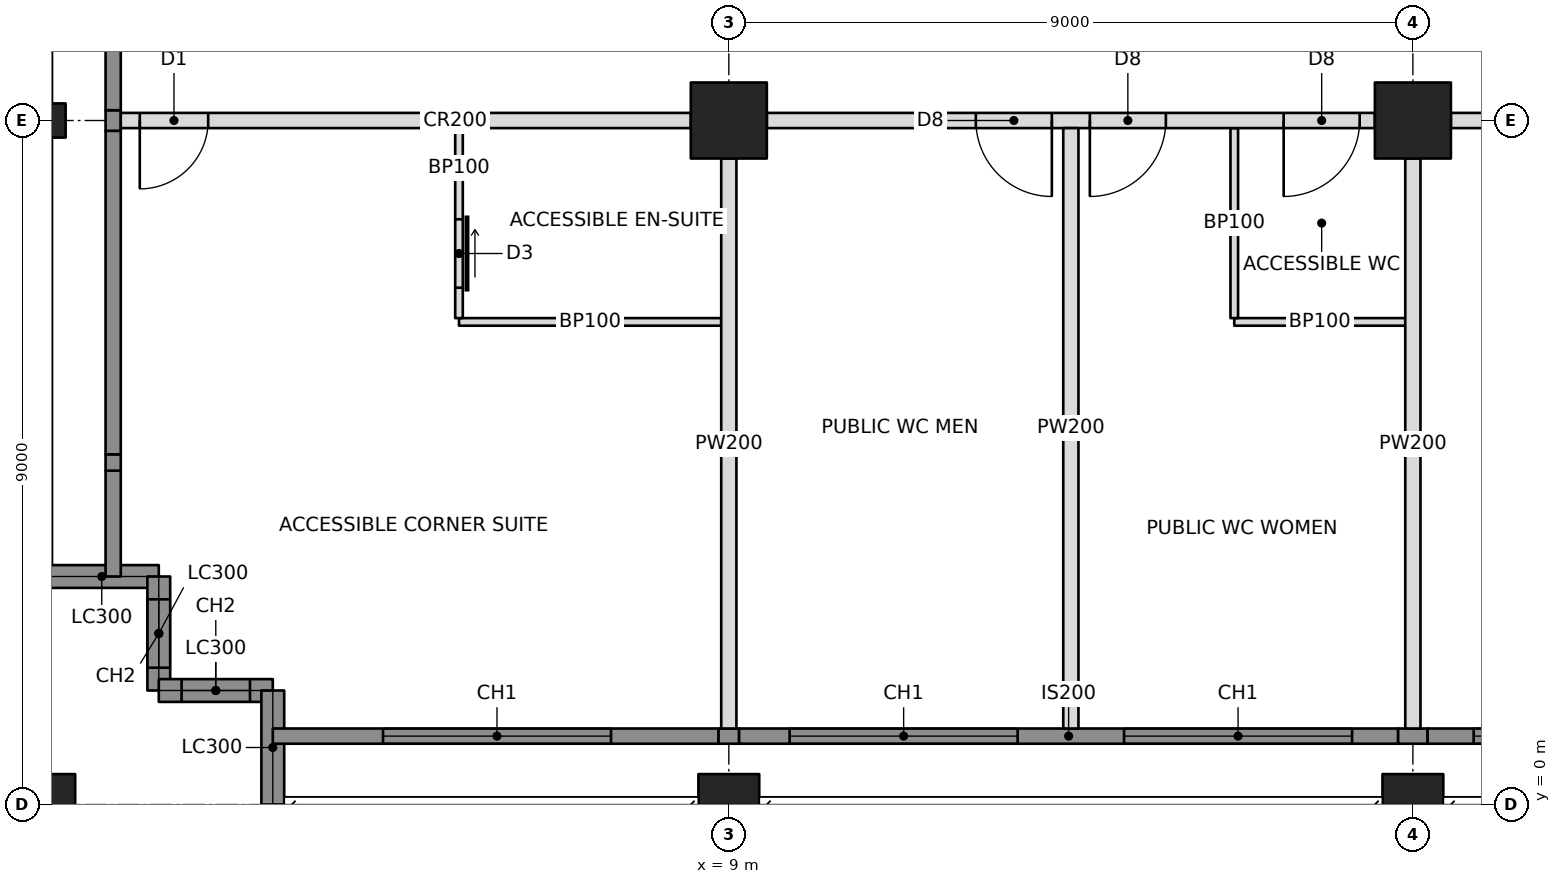
"""IFC4 building model, lengths in metres.
Left out: names, types, materials, properties, quantities, classifications, styles, units other than length and angle.
Written with IfcOpenShell. Run it as: python <this file> out.ifc"""

import sys

from ifc_helpers import new_model, si_unit, direction, frame, frame_2d, origin, origin_with_axes, origin_2d, place, context, subcontext, project, spatial, rectangle, hollow_rectangle, i_section, extrude, element, fill, save


model = new_model("IFC4")
c1 = context("Model", 3, precision=1e-05, world=origin(), true_north=direction((0.0, 1.0)))
c2 = subcontext(c1, "Body", "Model", "MODEL_VIEW")
j1 = project(units=[si_unit("LENGTHUNIT", "METRE"), si_unit("PLANEANGLEUNIT", "RADIAN")], contexts=[c1])
p1 = place(None, origin())
s1 = spatial("IfcSite", under=j1, at=p1, CompositionType="ELEMENT")
p2 = place(p1, origin())
s2 = spatial("IfcBuilding", under=s1, at=p2, CompositionType="ELEMENT")
p3 = place(p2, frame((0.0, 0.0, 94.2)))
s3 = spatial("IfcBuildingStorey", under=s2, at=p3, CompositionType="ELEMENT", Elevation=94.2)
p4 = place(p3, origin_with_axes())
e1 = element("IfcColumn", 1, at=p4, inside=s3, PredefinedType="COLUMN", context=c2, shape_type="SweptSolid", body=[
    extrude(hollow_rectangle(XDim=0.8, YDim=0.8, WallThickness=0.07, at=origin_2d()), origin(), (0.0, 0.0, 1.0), 3.4),
])
p5 = place(p3, frame((0.0, 9.0, 0.0), z_axis=(0.0, 0.0, 1.0), x_axis=(0.0, 1.0, 0.0)))
e2 = element("IfcColumn", 2, at=p5, inside=s3, PredefinedType="COLUMN", context=c2, shape_type="SweptSolid", body=[
    extrude(i_section(OverallWidth=0.449, OverallDepth=0.549, WebThickness=0.072, FlangeThickness=0.115, at=origin_2d()), origin(), (0.0, 0.0, 1.0), 3.4),
])
p6 = place(p3, frame((9.0, 0.0, 0.0), z_axis=(0.0, 0.0, 1.0), x_axis=(1.0, 0.0, 0.0)))
e3 = element("IfcColumn", 3, at=p6, inside=s3, PredefinedType="COLUMN", context=c2, shape_type="SweptSolid", body=[
    extrude(hollow_rectangle(XDim=0.8, YDim=0.8, WallThickness=0.07, at=origin_2d()), origin(), (0.0, 0.0, 1.0), 3.4),
])
p7 = place(p3, frame((9.0, 9.0, 0.0), z_axis=(0.0, 0.0, 1.0), x_axis=(1.0, 0.0, 0.0)))
e4 = element("IfcColumn", 4, at=p7, inside=s3, PredefinedType="COLUMN", context=c2, shape_type="SweptSolid", body=[
    extrude(hollow_rectangle(XDim=1.0, YDim=1.0, WallThickness=0.1, at=origin_2d()), origin(), (0.0, 0.0, 1.0), 3.4),
])
p8 = place(p3, frame((18.0, 0.0, 0.0), z_axis=(0.0, 0.0, 1.0), x_axis=(1.0, 0.0, 0.0)))
e5 = element("IfcColumn", 5, at=p8, inside=s3, PredefinedType="COLUMN", context=c2, shape_type="SweptSolid", body=[
    extrude(hollow_rectangle(XDim=0.8, YDim=0.8, WallThickness=0.07, at=origin_2d()), origin(), (0.0, 0.0, 1.0), 3.4),
])
p9 = place(p3, frame((18.0, 9.0, 0.0), z_axis=(0.0, 0.0, 1.0), x_axis=(1.0, 0.0, 0.0)))
e6 = element("IfcColumn", 6, at=p9, inside=s3, PredefinedType="COLUMN", context=c2, shape_type="SweptSolid", body=[
    extrude(hollow_rectangle(XDim=1.0, YDim=1.0, WallThickness=0.1, at=origin_2d()), origin(), (0.0, 0.0, 1.0), 3.4),
])
p10 = place(p3, frame((0.0, 3.0, 0.0), z_axis=(0.0, 0.0, 1.0), x_axis=(1.0, 0.0, 0.0)))
e7 = element("IfcWall", 7, at=p10, inside=s3, PredefinedType="SOLIDWALL", context=c2, shape_type="SweptSolid", body=[
    extrude(rectangle(XDim=1.5, YDim=0.3, at=frame_2d((0.75, 0.0))), origin(), (0.0, 0.0, 1.0), 2.42),
])
p11 = place(p3, frame((1.5, 3.0, 0.0), z_axis=(0.0, 0.0, 1.0), x_axis=(0.0, -1.0, 0.0)))
e8 = element("IfcWall", 8, at=p11, inside=s3, PredefinedType="SOLIDWALL", context=c2, shape_type="SweptSolid", body=[
    extrude(rectangle(XDim=1.5, YDim=0.3, at=frame_2d((0.75, 0.0))), origin(), (0.0, 0.0, 1.0), 3.2),
])
p12 = place(p11, frame((0.3, 0.0, 0.6)))
e9 = element("IfcOpeningElement", 9, at=p12, cuts=e8, PredefinedType="OPENING", context=c2, shape_type="SweptSolid", body=[
    extrude(rectangle(XDim=0.9, YDim=2.2, at=frame_2d((0.45, 1.1))), frame((0.0, 0.16, 0.0), z_axis=(0.0, -1.0, 0.0), x_axis=(1.0, 0.0, 0.0)), (0.0, 0.0, 1.0), 0.32),
])
p13 = place(p3, frame((1.5, 1.5, 0.0), z_axis=(0.0, 0.0, 1.0), x_axis=(1.0, 0.0, 0.0)))
e10 = element("IfcWall", 10, at=p13, inside=s3, PredefinedType="SOLIDWALL", context=c2, shape_type="SweptSolid", body=[
    extrude(rectangle(XDim=1.5, YDim=0.3, at=frame_2d((0.75, 0.0))), origin(), (0.0, 0.0, 1.0), 3.2),
])
p14 = place(p13, frame((0.3, 0.0, 0.6)))
e11 = element("IfcOpeningElement", 11, at=p14, cuts=e10, PredefinedType="OPENING", context=c2, shape_type="SweptSolid", body=[
    extrude(rectangle(XDim=0.9, YDim=2.2, at=frame_2d((0.45, 1.1))), frame((0.0, 0.16, 0.0), z_axis=(0.0, -1.0, 0.0), x_axis=(1.0, 0.0, 0.0)), (0.0, 0.0, 1.0), 0.32),
])
p15 = place(p3, frame((3.0, 1.5, 0.0), z_axis=(0.0, 0.0, 1.0), x_axis=(0.0, -1.0, 0.0)))
e12 = element("IfcWall", 12, at=p15, inside=s3, PredefinedType="SOLIDWALL", context=c2, shape_type="SweptSolid", body=[
    extrude(rectangle(XDim=1.5, YDim=0.3, at=frame_2d((0.75, 0.0))), origin(), (0.0, 0.0, 1.0), 2.42),
])
p16 = place(p3, frame((3.0, 0.9, 0.0), z_axis=(0.0, 0.0, 1.0), x_axis=(1.0, 0.0, 0.0)))
e13 = element("IfcWall", 13, at=p16, inside=s3, PredefinedType="SOLIDWALL", context=c2, shape_type="SweptSolid", body=[
    extrude(rectangle(XDim=5.865, YDim=0.2, at=frame_2d((2.932, 0.0))), origin(), (0.0, 0.0, 1.0), 3.2),
])
p17 = place(p16, frame((1.45, 0.0, 0.6)))
e14 = element("IfcOpeningElement", 14, at=p17, cuts=e13, PredefinedType="OPENING", context=c2, shape_type="SweptSolid", body=[
    extrude(rectangle(XDim=3.0, YDim=2.2, at=frame_2d((1.5, 1.1))), frame((0.0, 0.11, 0.0), z_axis=(0.0, -1.0, 0.0), x_axis=(1.0, 0.0, 0.0)), (0.0, 0.0, 1.0), 0.22),
])
p18 = place(p3, frame((0.9, 3.0, 0.0), z_axis=(0.0, 0.0, 1.0), x_axis=(0.0, 1.0, 0.0)))
e15 = element("IfcWall", 15, at=p18, inside=s3, PredefinedType="SOLIDWALL", context=c2, shape_type="SweptSolid", body=[
    extrude(rectangle(XDim=1.393, YDim=0.2, at=frame_2d((0.696, 0.0))), origin(), (0.0, 0.0, 1.0), 3.2),
])
p19 = place(p3, frame((1.0, 9.0, 0.0), z_axis=(0.0, 0.0, 1.0), x_axis=(1.0, 0.0, 0.0)))
e16 = element("IfcWall", 16, at=p19, inside=s3, PredefinedType="PARTITIONING", context=c2, shape_type="SweptSolid", body=[
    extrude(rectangle(XDim=7.5, YDim=0.2, at=frame_2d((3.75, 0.0))), origin(), (0.0, 0.0, 1.0), 2.438),
])
p20 = place(p19, frame((0.25, 0.0, 0.0)))
e17 = element("IfcOpeningElement", 17, at=p20, cuts=e16, PredefinedType="OPENING", context=c2, shape_type="SweptSolid", body=[
    extrude(rectangle(XDim=0.9, YDim=2.1, at=frame_2d((0.45, 1.05))), frame((0.0, 0.11, 0.0), z_axis=(0.0, -1.0, 0.0), x_axis=(1.0, 0.0, 0.0)), (0.0, 0.0, 1.0), 0.22),
])
p21 = place(p3, frame((9.5, 9.0, 0.0), z_axis=(0.0, 0.0, 1.0), x_axis=(1.0, 0.0, 0.0)))
e18 = element("IfcWall", 18, at=p21, inside=s3, PredefinedType="PARTITIONING", context=c2, shape_type="SweptSolid", body=[
    extrude(rectangle(XDim=8.0, YDim=0.2, at=frame_2d((4.0, 0.0))), origin(), (0.0, 0.0, 1.0), 2.405),
])
p22 = place(p21, frame((2.75, 0.0, 0.0)))
e19 = element("IfcOpeningElement", 19, at=p22, cuts=e18, PredefinedType="OPENING", context=c2, shape_type="SweptSolid", body=[
    extrude(rectangle(XDim=1.0, YDim=2.1, at=frame_2d((0.5, 1.05))), frame((0.0, 0.11, 0.0), z_axis=(0.0, -1.0, 0.0), x_axis=(1.0, 0.0, 0.0)), (0.0, 0.0, 1.0), 0.22),
])
p23 = place(p21, frame((6.8, 0.0, 0.0)))
e20 = element("IfcOpeningElement", 20, at=p23, cuts=e18, PredefinedType="OPENING", context=c2, shape_type="SweptSolid", body=[
    extrude(rectangle(XDim=1.0, YDim=2.1, at=frame_2d((0.5, 1.05))), frame((0.0, 0.11, 0.0), z_axis=(0.0, -1.0, 0.0), x_axis=(1.0, 0.0, 0.0)), (0.0, 0.0, 1.0), 0.22),
])
p24 = place(p21, frame((4.25, 0.0, 0.0)))
e21 = element("IfcOpeningElement", 21, at=p24, cuts=e18, PredefinedType="OPENING", context=c2, shape_type="SweptSolid", body=[
    extrude(rectangle(XDim=1.0, YDim=2.1, at=frame_2d((0.5, 1.05))), frame((0.0, 0.11, 0.0), z_axis=(0.0, -1.0, 0.0), x_axis=(1.0, 0.0, 0.0)), (0.0, 0.0, 1.0), 0.22),
])
p25 = place(p3, frame((18.5, 9.0, 0.0), z_axis=(0.0, 0.0, 1.0), x_axis=(1.0, 0.0, 0.0)))
e22 = element("IfcWall", 22, at=p25, inside=s3, PredefinedType="PARTITIONING", context=c2, shape_type="SweptSolid", body=[
    extrude(rectangle(XDim=2.85, YDim=0.2, at=frame_2d((1.425, 0.0))), origin(), (0.0, 0.0, 1.0), 2.405),
])
p26 = place(p3, frame((9.0, 8.5, 0.0), z_axis=(0.0, 0.0, 1.0), x_axis=(0.0, -1.0, 0.0)))
e23 = element("IfcWall", 23, at=p26, inside=s3, PredefinedType="PARTITIONING", context=c2, shape_type="SweptSolid", body=[
    extrude(rectangle(XDim=7.5, YDim=0.2, at=frame_2d((3.75, 0.0))), origin(), (0.0, 0.0, 1.0), 2.438),
])
p27 = place(p3, frame((18.0, 8.5, 0.0), z_axis=(0.0, 0.0, 1.0), x_axis=(0.0, -1.0, 0.0)))
e24 = element("IfcWall", 24, at=p27, inside=s3, PredefinedType="PARTITIONING", context=c2, shape_type="SweptSolid", body=[
    extrude(rectangle(XDim=7.5, YDim=0.2, at=frame_2d((3.75, 0.0))), origin(), (0.0, 0.0, 1.0), 2.405),
])
p28 = place(p3, frame((5.45, 6.35, 0.0), z_axis=(0.0, 0.0, 1.0), x_axis=(1.0, 0.0, 0.0)))
e25 = element("IfcWall", 25, at=p28, inside=s3, PredefinedType="PARTITIONING", context=c2, shape_type="SweptSolid", body=[
    extrude(rectangle(XDim=3.45, YDim=0.1, at=frame_2d((1.725, 0.0))), origin(), (0.0, 0.0, 1.0), 2.438),
])
p29 = place(p3, frame((5.45, 8.9, 0.0), z_axis=(0.0, 0.0, 1.0), x_axis=(0.0, -1.0, 0.0)))
e26 = element("IfcWall", 26, at=p29, inside=s3, PredefinedType="PARTITIONING", context=c2, shape_type="SweptSolid", body=[
    extrude(rectangle(XDim=2.5, YDim=0.1, at=frame_2d((1.25, 0.0))), origin(), (0.0, 0.0, 1.0), 2.438),
])
p30 = place(p29, frame((1.2, 0.0, 0.0)))
e27 = element("IfcOpeningElement", 27, at=p30, cuts=e26, PredefinedType="OPENING", context=c2, shape_type="SweptSolid", body=[
    extrude(rectangle(XDim=0.9, YDim=2.1, at=frame_2d((0.45, 1.05))), frame((0.0, 0.06, 0.0), z_axis=(0.0, -1.0, 0.0), x_axis=(1.0, 0.0, 0.0)), (0.0, 0.0, 1.0), 0.12),
])
p31 = place(p3, frame((13.5, 8.9, 0.0), z_axis=(0.0, 0.0, 1.0), x_axis=(0.0, -1.0, 0.0)))
e28 = element("IfcWall", 28, at=p31, inside=s3, PredefinedType="PARTITIONING", context=c2, shape_type="SweptSolid", body=[
    extrude(rectangle(XDim=7.9, YDim=0.2, at=frame_2d((3.95, 0.0))), origin(), (0.0, 0.0, 1.0), 2.404),
])
p32 = place(p3, frame((15.65, 6.35, 0.0), z_axis=(0.0, 0.0, 1.0), x_axis=(1.0, 0.0, 0.0)))
e29 = element("IfcWall", 29, at=p32, inside=s3, PredefinedType="PARTITIONING", context=c2, shape_type="SweptSolid", body=[
    extrude(rectangle(XDim=2.25, YDim=0.1, at=frame_2d((1.125, 0.0))), origin(), (0.0, 0.0, 1.0), 2.404),
])
p33 = place(p3, frame((15.65, 8.9, 0.0), z_axis=(0.0, 0.0, 1.0), x_axis=(0.0, -1.0, 0.0)))
e30 = element("IfcWall", 30, at=p33, inside=s3, PredefinedType="PARTITIONING", context=c2, shape_type="SweptSolid", body=[
    extrude(rectangle(XDim=2.5, YDim=0.1, at=frame_2d((1.25, 0.0))), origin(), (0.0, 0.0, 1.0), 2.404),
])
p34 = place(p3, frame((8.865, 0.9, 0.0), z_axis=(0.0, 0.0, 1.0), x_axis=(1.0, 0.0, 0.0)))
e31 = element("IfcWall", 31, at=p34, inside=s3, PredefinedType="SOLIDWALL", context=c2, shape_type="SweptSolid", body=[
    extrude(rectangle(XDim=0.271, YDim=0.2, at=frame_2d((0.135, 0.0))), origin(), (0.0, 0.0, 1.0), 2.438),
])
p35 = place(p3, frame((9.135, 0.9, 0.0), z_axis=(0.0, 0.0, 1.0), x_axis=(1.0, 0.0, 0.0)))
e32 = element("IfcWall", 32, at=p35, inside=s3, PredefinedType="SOLIDWALL", context=c2, shape_type="SweptSolid", body=[
    extrude(rectangle(XDim=8.671, YDim=0.2, at=frame_2d((4.335, 0.0))), origin(), (0.0, 0.0, 1.0), 3.2),
])
p36 = place(p35, frame((0.665, 0.0, 0.6)))
e33 = element("IfcOpeningElement", 33, at=p36, cuts=e32, PredefinedType="OPENING", context=c2, shape_type="SweptSolid", body=[
    extrude(rectangle(XDim=3.0, YDim=2.2, at=frame_2d((1.5, 1.1))), frame((0.0, 0.11, 0.0), z_axis=(0.0, -1.0, 0.0), x_axis=(1.0, 0.0, 0.0)), (0.0, 0.0, 1.0), 0.22),
])
p37 = place(p35, frame((5.065, 0.0, 0.6)))
e34 = element("IfcOpeningElement", 34, at=p37, cuts=e32, PredefinedType="OPENING", context=c2, shape_type="SweptSolid", body=[
    extrude(rectangle(XDim=3.0, YDim=2.2, at=frame_2d((1.5, 1.1))), frame((0.0, 0.11, 0.0), z_axis=(0.0, -1.0, 0.0), x_axis=(1.0, 0.0, 0.0)), (0.0, 0.0, 1.0), 0.22),
])
p38 = place(p3, frame((17.806, 0.9, 0.0), z_axis=(0.0, 0.0, 1.0), x_axis=(1.0, 0.0, 0.0)))
e35 = element("IfcWall", 35, at=p38, inside=s3, PredefinedType="SOLIDWALL", context=c2, shape_type="SweptSolid", body=[
    extrude(rectangle(XDim=0.388, YDim=0.2, at=frame_2d((0.194, 0.0))), origin(), (0.0, 0.0, 1.0), 2.404),
])
p39 = place(p3, frame((18.194, 0.9, 0.0), z_axis=(0.0, 0.0, 1.0), x_axis=(1.0, 0.0, 0.0)))
e36 = element("IfcWall", 36, at=p39, inside=s3, PredefinedType="SOLIDWALL", context=c2, shape_type="SweptSolid", body=[
    extrude(rectangle(XDim=8.612, YDim=0.2, at=frame_2d((4.306, 0.0))), origin(), (0.0, 0.0, 1.0), 3.2),
])
p40 = place(p39, frame((0.606, 0.0, 0.6)))
e37 = element("IfcOpeningElement", 37, at=p40, cuts=e36, PredefinedType="OPENING", context=c2, shape_type="SweptSolid", body=[
    extrude(rectangle(XDim=3.0, YDim=2.2, at=frame_2d((1.5, 1.1))), frame((0.0, 0.11, 0.0), z_axis=(0.0, -1.0, 0.0), x_axis=(1.0, 0.0, 0.0)), (0.0, 0.0, 1.0), 0.22),
])
p41 = place(p39, frame((5.006, 0.0, 0.6)))
e38 = element("IfcOpeningElement", 38, at=p41, cuts=e36, PredefinedType="OPENING", context=c2, shape_type="SweptSolid", body=[
    extrude(rectangle(XDim=3.0, YDim=2.2, at=frame_2d((1.5, 1.1))), frame((0.0, 0.11, 0.0), z_axis=(0.0, -1.0, 0.0), x_axis=(1.0, 0.0, 0.0)), (0.0, 0.0, 1.0), 0.22),
])
p42 = place(p3, frame((0.9, 4.393, 0.0), z_axis=(0.0, 0.0, 1.0), x_axis=(0.0, 1.0, 0.0)))
e39 = element("IfcWall", 39, at=p42, inside=s3, PredefinedType="SOLIDWALL", context=c2, shape_type="SweptSolid", body=[
    extrude(rectangle(XDim=0.215, YDim=0.2, at=frame_2d((0.107, 0.0))), origin(), (0.0, 0.0, 1.0), 2.661),
])
p43 = place(p3, frame((0.9, 4.607, 0.0), z_axis=(0.0, 0.0, 1.0), x_axis=(0.0, 1.0, 0.0)))
e40 = element("IfcWall", 40, at=p43, inside=s3, PredefinedType="SOLIDWALL", context=c2, shape_type="SweptSolid", body=[
    extrude(rectangle(XDim=4.257, YDim=0.2, at=frame_2d((2.129, 0.0))), origin(), (0.0, 0.0, 1.0), 3.2),
])
p44 = place(p3, frame((0.9, 8.865, 0.0), z_axis=(0.0, 0.0, 1.0), x_axis=(0.0, 1.0, 0.0)))
e41 = element("IfcWall", 41, at=p44, inside=s3, PredefinedType="SOLIDWALL", context=c2, shape_type="SweptSolid", body=[
    extrude(rectangle(XDim=0.271, YDim=0.2, at=frame_2d((0.135, 0.0))), origin(), (0.0, 0.0, 1.0), 2.438),
])
p45 = place(p3, frame((0.9, 9.135, 0.0), z_axis=(0.0, 0.0, 1.0), x_axis=(0.0, 1.0, 0.0)))
e42 = element("IfcWall", 42, at=p45, inside=s3, PredefinedType="SOLIDWALL", context=c2, shape_type="SweptSolid", body=[
    extrude(rectangle(XDim=8.671, YDim=0.2, at=frame_2d((4.335, 0.0))), origin(), (0.0, 0.0, 1.0), 3.2),
])
p46 = place(p45, frame((2.015, 0.0, 0.6)))
e43 = element("IfcOpeningElement", 43, at=p46, cuts=e42, PredefinedType="OPENING", context=c2, shape_type="SweptSolid", body=[
    extrude(rectangle(XDim=3.0, YDim=2.2, at=frame_2d((1.5, 1.1))), frame((0.0, 0.11, 0.0), z_axis=(0.0, -1.0, 0.0), x_axis=(1.0, 0.0, 0.0)), (0.0, 0.0, 1.0), 0.22),
])
p47 = place(p45, frame((5.515, 0.0, 0.6)))
e44 = element("IfcOpeningElement", 44, at=p47, cuts=e42, PredefinedType="OPENING", context=c2, shape_type="SweptSolid", body=[
    extrude(rectangle(XDim=3.0, YDim=2.2, at=frame_2d((1.5, 1.1))), frame((0.0, 0.11, 0.0), z_axis=(0.0, -1.0, 0.0), x_axis=(1.0, 0.0, 0.0)), (0.0, 0.0, 1.0), 0.22),
])
p48 = place(p12, origin())
e45 = element("IfcWindow", 45, at=p48, inside=s3, PartitioningType="SINGLE_PANEL", PredefinedType="WINDOW", context=c2, shape_type="SweptSolid", body=[
    extrude(rectangle(XDim=0.9, YDim=2.2, at=frame_2d((0.45, 1.1))), frame((0.0, 0.03, 0.0), z_axis=(0.0, -1.0, 0.0), x_axis=(1.0, 0.0, 0.0)), (0.0, 0.0, 1.0), 0.06),
])
fill(e9, e45)
p49 = place(p14, origin())
e46 = element("IfcWindow", 46, at=p49, inside=s3, PartitioningType="SINGLE_PANEL", PredefinedType="WINDOW", context=c2, shape_type="SweptSolid", body=[
    extrude(rectangle(XDim=0.9, YDim=2.2, at=frame_2d((0.45, 1.1))), frame((0.0, 0.03, 0.0), z_axis=(0.0, -1.0, 0.0), x_axis=(1.0, 0.0, 0.0)), (0.0, 0.0, 1.0), 0.06),
])
fill(e11, e46)
p50 = place(p17, origin())
e47 = element("IfcWindow", 47, at=p50, inside=s3, PartitioningType="TRIPLE_PANEL_VERTICAL", PredefinedType="WINDOW", context=c2, shape_type="SweptSolid", body=[
    extrude(rectangle(XDim=3.0, YDim=2.2, at=frame_2d((1.5, 1.1))), frame((0.0, 0.03, 0.0), z_axis=(0.0, -1.0, 0.0), x_axis=(1.0, 0.0, 0.0)), (0.0, 0.0, 1.0), 0.06),
])
fill(e14, e47)
p51 = place(p36, origin())
e48 = element("IfcWindow", 48, at=p51, inside=s3, PartitioningType="TRIPLE_PANEL_VERTICAL", PredefinedType="WINDOW", context=c2, shape_type="SweptSolid", body=[
    extrude(rectangle(XDim=3.0, YDim=2.2, at=frame_2d((1.5, 1.1))), frame((0.0, 0.03, 0.0), z_axis=(0.0, -1.0, 0.0), x_axis=(1.0, 0.0, 0.0)), (0.0, 0.0, 1.0), 0.06),
])
fill(e33, e48)
p52 = place(p37, origin())
e49 = element("IfcWindow", 49, at=p52, inside=s3, PartitioningType="TRIPLE_PANEL_VERTICAL", PredefinedType="WINDOW", context=c2, shape_type="SweptSolid", body=[
    extrude(rectangle(XDim=3.0, YDim=2.2, at=frame_2d((1.5, 1.1))), frame((0.0, 0.03, 0.0), z_axis=(0.0, -1.0, 0.0), x_axis=(1.0, 0.0, 0.0)), (0.0, 0.0, 1.0), 0.06),
])
fill(e34, e49)
p53 = place(p40, origin())
e50 = element("IfcWindow", 50, at=p53, inside=s3, PartitioningType="TRIPLE_PANEL_VERTICAL", PredefinedType="WINDOW", context=c2, shape_type="SweptSolid", body=[
    extrude(rectangle(XDim=3.0, YDim=2.2, at=frame_2d((1.5, 1.1))), frame((0.0, 0.03, 0.0), z_axis=(0.0, -1.0, 0.0), x_axis=(1.0, 0.0, 0.0)), (0.0, 0.0, 1.0), 0.06),
])
fill(e37, e50)
p54 = place(p30, origin())
e51 = element("IfcDoor", 51, at=p54, inside=s3, OperationType="SLIDING_TO_LEFT", PredefinedType="DOOR", context=c2, shape_type="SweptSolid", body=[
    extrude(rectangle(XDim=0.9, YDim=2.1, at=frame_2d((0.45, 1.05))), frame((0.0, 0.025, 0.0), z_axis=(0.0, -1.0, 0.0), x_axis=(1.0, 0.0, 0.0)), (0.0, 0.0, 1.0), 0.05),
])
fill(e27, e51)
p55 = place(p20, frame((0.9, 0.0, 0.0), z_axis=(0.0, 0.0, 1.0), x_axis=(-1.0, 0.0, 0.0)))
e52 = element("IfcDoor", 52, at=p55, inside=s3, OperationType="SINGLE_SWING_RIGHT", PredefinedType="DOOR", context=c2, shape_type="SweptSolid", body=[
    extrude(rectangle(XDim=0.9, YDim=2.1, at=frame_2d((0.45, 1.05))), frame((0.0, 0.025, 0.0), z_axis=(0.0, -1.0, 0.0), x_axis=(1.0, 0.0, 0.0)), (0.0, 0.0, 1.0), 0.05),
])
fill(e17, e52)
p56 = place(p22, frame((1.0, 0.0, 0.0), z_axis=(0.0, 0.0, 1.0), x_axis=(-1.0, 0.0, 0.0)))
e53 = element("IfcDoor", 53, at=p56, inside=s3, OperationType="SINGLE_SWING_LEFT", PredefinedType="DOOR", context=c2, shape_type="SweptSolid", body=[
    extrude(rectangle(XDim=1.0, YDim=2.1, at=frame_2d((0.5, 1.05))), frame((0.0, 0.025, 0.0), z_axis=(0.0, -1.0, 0.0), x_axis=(1.0, 0.0, 0.0)), (0.0, 0.0, 1.0), 0.05),
])
fill(e19, e53)
p57 = place(p23, frame((1.0, 0.0, 0.0), z_axis=(0.0, 0.0, 1.0), x_axis=(-1.0, 0.0, 0.0)))
e54 = element("IfcDoor", 54, at=p57, inside=s3, OperationType="SINGLE_SWING_RIGHT", PredefinedType="DOOR", context=c2, shape_type="SweptSolid", body=[
    extrude(rectangle(XDim=1.0, YDim=2.1, at=frame_2d((0.5, 1.05))), frame((0.0, 0.025, 0.0), z_axis=(0.0, -1.0, 0.0), x_axis=(1.0, 0.0, 0.0)), (0.0, 0.0, 1.0), 0.05),
])
fill(e20, e54)
p58 = place(p24, frame((1.0, 0.0, 0.0), z_axis=(0.0, 0.0, 1.0), x_axis=(-1.0, 0.0, 0.0)))
e55 = element("IfcDoor", 55, at=p58, inside=s3, OperationType="SINGLE_SWING_RIGHT", PredefinedType="DOOR", context=c2, shape_type="SweptSolid", body=[
    extrude(rectangle(XDim=1.0, YDim=2.1, at=frame_2d((0.5, 1.05))), frame((0.0, 0.025, 0.0), z_axis=(0.0, -1.0, 0.0), x_axis=(1.0, 0.0, 0.0)), (0.0, 0.0, 1.0), 0.05),
])
fill(e21, e55)
save(model, sys.argv[1])
